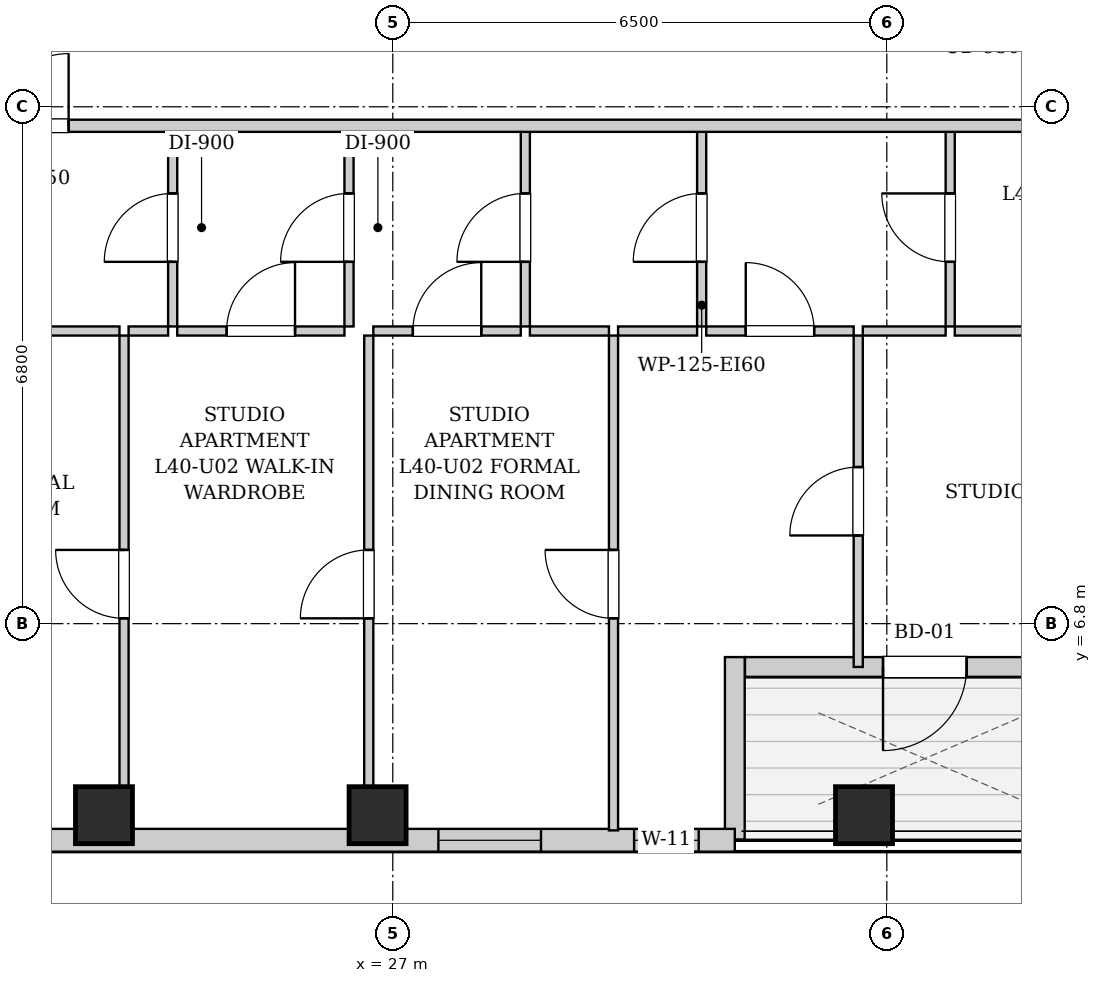
"""IFC4 building model, lengths in metres.
Left out: names, types, materials, properties, quantities, classifications, styles, units other than length and angle.
Written with IfcOpenShell. Run it as: python <this file> out.ifc"""

import sys

from ifc_helpers import new_model, si_unit, direction, frame, frame_2d, origin, origin_2d, place, context, subcontext, project, spatial, rectangle, extrude, element, fill, save


model = new_model("IFC4")
c1 = context("Model", 3, precision=1e-05, world=origin(), true_north=direction((0.0, 1.0)))
c2 = subcontext(c1, "Body", "Model", "MODEL_VIEW")
j1 = project(units=[si_unit("LENGTHUNIT", "METRE"), si_unit("PLANEANGLEUNIT", "RADIAN")], contexts=[c1])
p1 = place(None, origin())
s1 = spatial("IfcSite", under=j1, at=p1, CompositionType="ELEMENT")
p2 = place(p1, origin())
s2 = spatial("IfcBuilding", under=s1, at=p2, CompositionType="ELEMENT")
p3 = place(p2, frame((0.0, 0.0, 140.65)))
s3 = spatial("IfcBuildingStorey", under=s2, at=p3, CompositionType="ELEMENT", Elevation=140.65)
for number, where, z_axis, x_axis in (
    (1, (23.2, 4.28, 0.0), (0.0, 0.0, 1.0), (1.0, 0.0, 0.0)),
    (2, (26.8, 4.28, 0.0), (0.0, 0.0, 1.0), (1.0, 0.0, 0.0)),
    (3, (33.2, 4.28, 0.0), (0.0, 0.0, 1.0), (1.0, 0.0, 0.0)),
):
    element("IfcColumn", number, at=place(p3, frame(where, z_axis=z_axis, x_axis=x_axis)), inside=s3, PredefinedType="COLUMN", context=c2, shape_type="SweptSolid", body=[
        extrude(rectangle(XDim=0.75, YDim=0.75, at=origin_2d()), origin(), (0.0, 0.0, 1.0), 3.25),
    ])
p4 = place(p3, frame((36.366, 6.23, 0.0), z_axis=(0.0, 0.0, 1.0), x_axis=(-1.0, 0.0, 0.0)))
e4 = element("IfcWall", 4, at=p4, inside=s3, PredefinedType="SOLIDWALL", context=c2, shape_type="SweptSolid", body=[
    extrude(rectangle(XDim=4.732, YDim=0.26, at=frame_2d((2.366, 0.0))), origin(), (0.0, 0.0, 1.0), 2.99),
])
p5 = place(p4, frame((1.816, 0.0, 0.0)))
e5 = element("IfcOpeningElement", 5, at=p5, cuts=e4, PredefinedType="OPENING", context=c2, shape_type="SweptSolid", body=[
    extrude(rectangle(XDim=1.1, YDim=2.0, at=frame_2d((0.55, 1.0))), frame((0.0, 0.14, 0.0), z_axis=(0.0, -1.0, 0.0), x_axis=(1.0, 0.0, 0.0)), (0.0, 0.0, 1.0), 0.28),
])
p6 = place(p3, frame((31.5, 6.36, 0.0), z_axis=(0.0, 0.0, 1.0), x_axis=(0.0, -1.0, 0.0)))
e6 = element("IfcWall", 6, at=p6, inside=s3, PredefinedType="SOLIDWALL", context=c2, shape_type="SweptSolid", body=[
    extrude(rectangle(XDim=2.4, YDim=0.26, at=frame_2d((1.2, 0.0))), origin(), (0.0, 0.0, 1.0), 2.99),
])
p7 = place(p3, frame((31.5, 3.95, 0.0), z_axis=(0.0, 0.0, 1.0), x_axis=(-1.0, 0.0, 0.0)))
e7 = element("IfcWall", 7, at=p7, inside=s3, PredefinedType="SOLIDWALL", context=c2, shape_type="SweptSolid", body=[
    extrude(rectangle(XDim=13.2, YDim=0.3, at=frame_2d((6.6, 0.0))), origin(), (0.0, 0.0, 1.0), 2.99),
])
p8 = place(p7, frame((11.476, 0.0, 0.55)))
e8 = element("IfcOpeningElement", 8, at=p8, cuts=e7, PredefinedType="OPENING", context=c2, shape_type="SweptSolid", body=[
    extrude(rectangle(XDim=1.35, YDim=1.2, at=frame_2d((0.675, 0.6))), frame((0.0, 0.16, 0.0), z_axis=(0.0, -1.0, 0.0), x_axis=(1.0, 0.0, 0.0)), (0.0, 0.0, 1.0), 0.32),
])
p9 = place(p7, frame((9.0, 0.0, 0.55)))
e9 = element("IfcOpeningElement", 9, at=p9, cuts=e7, PredefinedType="OPENING", context=c2, shape_type="SweptSolid", body=[
    extrude(rectangle(XDim=1.35, YDim=1.2, at=frame_2d((0.675, 0.6))), frame((0.0, 0.16, 0.0), z_axis=(0.0, -1.0, 0.0), x_axis=(1.0, 0.0, 0.0)), (0.0, 0.0, 1.0), 0.32),
])
p10 = place(p7, frame((2.55, 0.0, 0.55)))
e10 = element("IfcOpeningElement", 10, at=p10, cuts=e7, PredefinedType="OPENING", context=c2, shape_type="SweptSolid", body=[
    extrude(rectangle(XDim=1.35, YDim=1.2, at=frame_2d((0.675, 0.6))), frame((0.0, 0.16, 0.0), z_axis=(0.0, -1.0, 0.0), x_axis=(1.0, 0.0, 0.0)), (0.0, 0.0, 1.0), 0.32),
])
p11 = place(p7, frame((0.475, 0.0, 0.55)))
e11 = element("IfcOpeningElement", 11, at=p11, cuts=e7, PredefinedType="OPENING", context=c2, shape_type="SweptSolid", body=[
    extrude(rectangle(XDim=0.85, YDim=1.2, at=frame_2d((0.425, 0.6))), frame((0.0, 0.16, 0.0), z_axis=(0.0, -1.0, 0.0), x_axis=(1.0, 0.0, 0.0)), (0.0, 0.0, 1.0), 0.32),
])
p12 = place(p3, frame((24.104, 10.71, 0.0), z_axis=(0.0, 0.0, 1.0), x_axis=(0.0, 1.0, 0.0)))
e12 = element("IfcWall", 12, at=p12, inside=s3, PredefinedType="PARTITIONING", context=c2, shape_type="SweptSolid", body=[
    extrude(rectangle(XDim=2.6, YDim=0.12, at=frame_2d((1.3, 0.0))), origin(), (0.0, 0.0, 1.0), 2.99),
])
p13 = place(p12, frame((0.85, 0.0, 0.0)))
e13 = element("IfcOpeningElement", 13, at=p13, cuts=e12, PredefinedType="OPENING", context=c2, shape_type="SweptSolid", body=[
    extrude(rectangle(XDim=0.9, YDim=2.05, at=frame_2d((0.45, 1.025))), frame((0.0, 0.07, 0.0), z_axis=(0.0, -1.0, 0.0), x_axis=(1.0, 0.0, 0.0)), (0.0, 0.0, 1.0), 0.14),
])
p14 = place(p3, frame((20.304, 10.65, 0.0), z_axis=(0.0, 0.0, 1.0), x_axis=(1.0, 0.0, 0.0)))
e14 = element("IfcWall", 14, at=p14, inside=s3, PredefinedType="PARTITIONING", context=c2, shape_type="SweptSolid", body=[
    extrude(rectangle(XDim=3.1, YDim=0.12, at=frame_2d((1.55, 0.0))), origin(), (0.0, 0.0, 1.0), 2.99),
])
p15 = place(p14, frame((1.1, 0.0, 0.0)))
e15 = element("IfcOpeningElement", 15, at=p15, cuts=e14, PredefinedType="OPENING", context=c2, shape_type="SweptSolid", body=[
    extrude(rectangle(XDim=0.9, YDim=2.05, at=frame_2d((0.45, 1.025))), frame((0.0, 0.07, 0.0), z_axis=(0.0, -1.0, 0.0), x_axis=(1.0, 0.0, 0.0)), (0.0, 0.0, 1.0), 0.14),
])
p16 = place(p3, frame((23.524, 10.65, 0.0), z_axis=(0.0, 0.0, 1.0), x_axis=(1.0, 0.0, 0.0)))
e16 = element("IfcWall", 16, at=p16, inside=s3, PredefinedType="PARTITIONING", context=c2, shape_type="SweptSolid", body=[
    extrude(rectangle(XDim=0.52, YDim=0.12, at=frame_2d((0.26, 0.0))), origin(), (0.0, 0.0, 1.0), 2.99),
])
p17 = place(p3, frame((26.424, 10.71, 0.0), z_axis=(0.0, 0.0, 1.0), x_axis=(0.0, 1.0, 0.0)))
e17 = element("IfcWall", 17, at=p17, inside=s3, PredefinedType="PARTITIONING", context=c2, shape_type="SweptSolid", body=[
    extrude(rectangle(XDim=2.6, YDim=0.12, at=frame_2d((1.3, 0.0))), origin(), (0.0, 0.0, 1.0), 2.99),
])
p18 = place(p17, frame((0.85, 0.0, 0.0)))
e18 = element("IfcOpeningElement", 18, at=p18, cuts=e17, PredefinedType="OPENING", context=c2, shape_type="SweptSolid", body=[
    extrude(rectangle(XDim=0.9, YDim=2.05, at=frame_2d((0.45, 1.025))), frame((0.0, 0.07, 0.0), z_axis=(0.0, -1.0, 0.0), x_axis=(1.0, 0.0, 0.0)), (0.0, 0.0, 1.0), 0.14),
])
p19 = place(p3, frame((24.164, 10.65, 0.0), z_axis=(0.0, 0.0, 1.0), x_axis=(1.0, 0.0, 0.0)))
e19 = element("IfcWall", 19, at=p19, inside=s3, PredefinedType="PARTITIONING", context=c2, shape_type="SweptSolid", body=[
    extrude(rectangle(XDim=2.2, YDim=0.12, at=frame_2d((1.1, 0.0))), origin(), (0.0, 0.0, 1.0), 2.99),
])
p20 = place(p19, frame((0.65, 0.0, 0.0)))
e20 = element("IfcOpeningElement", 20, at=p20, cuts=e19, PredefinedType="OPENING", context=c2, shape_type="SweptSolid", body=[
    extrude(rectangle(XDim=0.9, YDim=2.05, at=frame_2d((0.45, 1.025))), frame((0.0, 0.07, 0.0), z_axis=(0.0, -1.0, 0.0), x_axis=(1.0, 0.0, 0.0)), (0.0, 0.0, 1.0), 0.14),
])
p21 = place(p3, frame((28.744, 10.71, 0.0), z_axis=(0.0, 0.0, 1.0), x_axis=(0.0, 1.0, 0.0)))
e21 = element("IfcWall", 21, at=p21, inside=s3, PredefinedType="PARTITIONING", context=c2, shape_type="SweptSolid", body=[
    extrude(rectangle(XDim=2.6, YDim=0.12, at=frame_2d((1.3, 0.0))), origin(), (0.0, 0.0, 1.0), 2.99),
])
p22 = place(p21, frame((0.85, 0.0, 0.0)))
e22 = element("IfcOpeningElement", 22, at=p22, cuts=e21, PredefinedType="OPENING", context=c2, shape_type="SweptSolid", body=[
    extrude(rectangle(XDim=0.9, YDim=2.05, at=frame_2d((0.45, 1.025))), frame((0.0, 0.07, 0.0), z_axis=(0.0, -1.0, 0.0), x_axis=(1.0, 0.0, 0.0)), (0.0, 0.0, 1.0), 0.14),
])
p23 = place(p3, frame((26.744, 10.65, 0.0), z_axis=(0.0, 0.0, 1.0), x_axis=(1.0, 0.0, 0.0)))
e23 = element("IfcWall", 23, at=p23, inside=s3, PredefinedType="PARTITIONING", context=c2, shape_type="SweptSolid", body=[
    extrude(rectangle(XDim=1.94, YDim=0.12, at=frame_2d((0.97, 0.0))), origin(), (0.0, 0.0, 1.0), 2.99),
])
p24 = place(p23, frame((0.52, 0.0, 0.0)))
e24 = element("IfcOpeningElement", 24, at=p24, cuts=e23, PredefinedType="OPENING", context=c2, shape_type="SweptSolid", body=[
    extrude(rectangle(XDim=0.9, YDim=2.05, at=frame_2d((0.45, 1.025))), frame((0.0, 0.07, 0.0), z_axis=(0.0, -1.0, 0.0), x_axis=(1.0, 0.0, 0.0)), (0.0, 0.0, 1.0), 0.14),
])
p25 = place(p3, frame((31.064, 10.71, 0.0), z_axis=(0.0, 0.0, 1.0), x_axis=(0.0, 1.0, 0.0)))
e25 = element("IfcWall", 25, at=p25, inside=s3, PredefinedType="PARTITIONING", context=c2, shape_type="SweptSolid", body=[
    extrude(rectangle(XDim=2.6, YDim=0.12, at=frame_2d((1.3, 0.0))), origin(), (0.0, 0.0, 1.0), 2.99),
])
p26 = place(p25, frame((0.85, 0.0, 0.0)))
e26 = element("IfcOpeningElement", 26, at=p26, cuts=e25, PredefinedType="OPENING", context=c2, shape_type="SweptSolid", body=[
    extrude(rectangle(XDim=0.9, YDim=2.05, at=frame_2d((0.45, 1.025))), frame((0.0, 0.07, 0.0), z_axis=(0.0, -1.0, 0.0), x_axis=(1.0, 0.0, 0.0)), (0.0, 0.0, 1.0), 0.14),
])
p27 = place(p3, frame((28.804, 10.65, 0.0), z_axis=(0.0, 0.0, 1.0), x_axis=(1.0, 0.0, 0.0)))
e27 = element("IfcWall", 27, at=p27, inside=s3, PredefinedType="PARTITIONING", context=c2, shape_type="SweptSolid", body=[
    extrude(rectangle(XDim=1.04, YDim=0.12, at=frame_2d((0.52, 0.0))), origin(), (0.0, 0.0, 1.0), 2.99),
])
p28 = place(p3, frame((29.964, 10.65, 0.0), z_axis=(0.0, 0.0, 1.0), x_axis=(1.0, 0.0, 0.0)))
e28 = element("IfcWall", 28, at=p28, inside=s3, PredefinedType="PARTITIONING", context=c2, shape_type="SweptSolid", body=[
    extrude(rectangle(XDim=1.04, YDim=0.12, at=frame_2d((0.52, 0.0))), origin(), (0.0, 0.0, 1.0), 2.99),
])
p29 = place(p3, frame((34.334, 10.71, 0.0), z_axis=(0.0, 0.0, 1.0), x_axis=(0.0, 1.0, 0.0)))
e29 = element("IfcWall", 29, at=p29, inside=s3, PredefinedType="PARTITIONING", context=c2, shape_type="SweptSolid", body=[
    extrude(rectangle(XDim=2.6, YDim=0.12, at=frame_2d((1.3, 0.0))), origin(), (0.0, 0.0, 1.0), 2.99),
])
p30 = place(p29, frame((0.85, 0.0, 0.0)))
e30 = element("IfcOpeningElement", 30, at=p30, cuts=e29, PredefinedType="OPENING", context=c2, shape_type="SweptSolid", body=[
    extrude(rectangle(XDim=0.9, YDim=2.05, at=frame_2d((0.45, 1.025))), frame((0.0, 0.07, 0.0), z_axis=(0.0, -1.0, 0.0), x_axis=(1.0, 0.0, 0.0)), (0.0, 0.0, 1.0), 0.14),
])
p31 = place(p3, frame((31.124, 10.65, 0.0), z_axis=(0.0, 0.0, 1.0), x_axis=(1.0, 0.0, 0.0)))
e31 = element("IfcWall", 31, at=p31, inside=s3, PredefinedType="PARTITIONING", context=c2, shape_type="SweptSolid", body=[
    extrude(rectangle(XDim=1.94, YDim=0.12, at=frame_2d((0.97, 0.0))), origin(), (0.0, 0.0, 1.0), 2.99),
])
p32 = place(p31, frame((0.52, 0.0, 0.0)))
e32 = element("IfcOpeningElement", 32, at=p32, cuts=e31, PredefinedType="OPENING", context=c2, shape_type="SweptSolid", body=[
    extrude(rectangle(XDim=0.9, YDim=2.05, at=frame_2d((0.45, 1.025))), frame((0.0, 0.07, 0.0), z_axis=(0.0, -1.0, 0.0), x_axis=(1.0, 0.0, 0.0)), (0.0, 0.0, 1.0), 0.14),
])
p33 = place(p3, frame((33.184, 10.65, 0.0), z_axis=(0.0, 0.0, 1.0), x_axis=(1.0, 0.0, 0.0)))
e33 = element("IfcWall", 33, at=p33, inside=s3, PredefinedType="PARTITIONING", context=c2, shape_type="SweptSolid", body=[
    extrude(rectangle(XDim=1.09, YDim=0.12, at=frame_2d((0.545, 0.0))), origin(), (0.0, 0.0, 1.0), 2.99),
])
p34 = place(p3, frame((34.394, 10.65, 0.0), z_axis=(0.0, 0.0, 1.0), x_axis=(1.0, 0.0, 0.0)))
e34 = element("IfcWall", 34, at=p34, inside=s3, PredefinedType="PARTITIONING", context=c2, shape_type="SweptSolid", body=[
    extrude(rectangle(XDim=3.326, YDim=0.12, at=frame_2d((1.663, 0.0))), origin(), (0.0, 0.0, 1.0), 2.99),
])
p35 = place(p34, frame((1.213, 0.0, 0.0)))
e35 = element("IfcOpeningElement", 35, at=p35, cuts=e34, PredefinedType="OPENING", context=c2, shape_type="SweptSolid", body=[
    extrude(rectangle(XDim=0.9, YDim=2.05, at=frame_2d((0.45, 1.025))), frame((0.0, 0.07, 0.0), z_axis=(0.0, -1.0, 0.0), x_axis=(1.0, 0.0, 0.0)), (0.0, 0.0, 1.0), 0.14),
])
p36 = place(p3, frame((23.464, 4.08, 0.0), z_axis=(0.0, 0.0, 1.0), x_axis=(0.0, 1.0, 0.0)))
e36 = element("IfcWall", 36, at=p36, inside=s3, PredefinedType="PARTITIONING", context=c2, shape_type="SweptSolid", body=[
    extrude(rectangle(XDim=6.51, YDim=0.12, at=frame_2d((3.255, 0.0))), origin(), (0.0, 0.0, 1.0), 2.99),
])
p37 = place(p36, frame((2.79, 0.0, 0.0)))
e37 = element("IfcOpeningElement", 37, at=p37, cuts=e36, PredefinedType="OPENING", context=c2, shape_type="SweptSolid", body=[
    extrude(rectangle(XDim=0.9, YDim=2.05, at=frame_2d((0.45, 1.025))), frame((0.0, 0.07, 0.0), z_axis=(0.0, -1.0, 0.0), x_axis=(1.0, 0.0, 0.0)), (0.0, 0.0, 1.0), 0.14),
])
p38 = place(p3, frame((26.684, 4.08, 0.0), z_axis=(0.0, 0.0, 1.0), x_axis=(0.0, 1.0, 0.0)))
e38 = element("IfcWall", 38, at=p38, inside=s3, PredefinedType="PARTITIONING", context=c2, shape_type="SweptSolid", body=[
    extrude(rectangle(XDim=6.51, YDim=0.12, at=frame_2d((3.255, 0.0))), origin(), (0.0, 0.0, 1.0), 2.99),
])
p39 = place(p38, frame((2.79, 0.0, 0.0)))
e39 = element("IfcOpeningElement", 39, at=p39, cuts=e38, PredefinedType="OPENING", context=c2, shape_type="SweptSolid", body=[
    extrude(rectangle(XDim=0.9, YDim=2.05, at=frame_2d((0.45, 1.025))), frame((0.0, 0.07, 0.0), z_axis=(0.0, -1.0, 0.0), x_axis=(1.0, 0.0, 0.0)), (0.0, 0.0, 1.0), 0.14),
])
p40 = place(p3, frame((29.904, 4.08, 0.0), z_axis=(0.0, 0.0, 1.0), x_axis=(0.0, 1.0, 0.0)))
e40 = element("IfcWall", 40, at=p40, inside=s3, PredefinedType="PARTITIONING", context=c2, shape_type="SweptSolid", body=[
    extrude(rectangle(XDim=6.51, YDim=0.12, at=frame_2d((3.255, 0.0))), origin(), (0.0, 0.0, 1.0), 2.99),
])
p41 = place(p40, frame((2.79, 0.0, 0.0)))
e41 = element("IfcOpeningElement", 41, at=p41, cuts=e40, PredefinedType="OPENING", context=c2, shape_type="SweptSolid", body=[
    extrude(rectangle(XDim=0.9, YDim=2.05, at=frame_2d((0.45, 1.025))), frame((0.0, 0.07, 0.0), z_axis=(0.0, -1.0, 0.0), x_axis=(1.0, 0.0, 0.0)), (0.0, 0.0, 1.0), 0.14),
])
p42 = place(p3, frame((33.124, 6.23, 0.0), z_axis=(0.0, 0.0, 1.0), x_axis=(0.0, 1.0, 0.0)))
e42 = element("IfcWall", 42, at=p42, inside=s3, PredefinedType="PARTITIONING", context=c2, shape_type="SweptSolid", body=[
    extrude(rectangle(XDim=4.36, YDim=0.12, at=frame_2d((2.18, 0.0))), origin(), (0.0, 0.0, 1.0), 2.426),
])
p43 = place(p42, frame((1.73, 0.0, 0.0)))
e43 = element("IfcOpeningElement", 43, at=p43, cuts=e42, PredefinedType="OPENING", context=c2, shape_type="SweptSolid", body=[
    extrude(rectangle(XDim=0.9, YDim=2.05, at=frame_2d((0.45, 1.025))), frame((0.0, 0.07, 0.0), z_axis=(0.0, -1.0, 0.0), x_axis=(1.0, 0.0, 0.0)), (0.0, 0.0, 1.0), 0.14),
])
p44 = place(p3, frame((10.05, 13.35, 0.0), z_axis=(0.0, 0.0, 1.0), x_axis=(1.0, 0.0, 0.0)))
e44 = element("IfcWall", 44, at=p44, inside=s3, PredefinedType="PARTITIONING", context=c2, shape_type="SweptSolid", body=[
    extrude(rectangle(XDim=27.7, YDim=0.16, at=frame_2d((13.85, 0.0))), origin(), (0.0, 0.0, 1.0), 2.99),
])
p45 = place(p44, frame((4.063, 0.0, 0.0)))
e45 = element("IfcOpeningElement", 45, at=p45, cuts=e44, PredefinedType="OPENING", context=c2, shape_type="SweptSolid", body=[
    extrude(rectangle(XDim=0.95, YDim=2.1, at=frame_2d((0.475, 1.05))), frame((0.0, 0.09, 0.0), z_axis=(0.0, -1.0, 0.0), x_axis=(1.0, 0.0, 0.0)), (0.0, 0.0, 1.0), 0.18),
])
p46 = place(p44, frame((11.735, 0.0, 0.0)))
e46 = element("IfcOpeningElement", 46, at=p46, cuts=e44, PredefinedType="OPENING", context=c2, shape_type="SweptSolid", body=[
    extrude(rectangle(XDim=0.95, YDim=2.1, at=frame_2d((0.475, 1.05))), frame((0.0, 0.09, 0.0), z_axis=(0.0, -1.0, 0.0), x_axis=(1.0, 0.0, 0.0)), (0.0, 0.0, 1.0), 0.18),
])
p47 = place(p13, origin())
e47 = element("IfcDoor", 47, at=p47, inside=s3, OperationType="SINGLE_SWING_LEFT", PredefinedType="DOOR", context=c2, shape_type="SweptSolid", body=[
    extrude(rectangle(XDim=0.9, YDim=2.05, at=frame_2d((0.45, 1.025))), frame((0.0, 0.025, 0.0), z_axis=(0.0, -1.0, 0.0), x_axis=(1.0, 0.0, 0.0)), (0.0, 0.0, 1.0), 0.05),
])
fill(e13, e47)
p48 = place(p18, origin())
e48 = element("IfcDoor", 48, at=p48, inside=s3, OperationType="SINGLE_SWING_LEFT", PredefinedType="DOOR", context=c2, shape_type="SweptSolid", body=[
    extrude(rectangle(XDim=0.9, YDim=2.05, at=frame_2d((0.45, 1.025))), frame((0.0, 0.025, 0.0), z_axis=(0.0, -1.0, 0.0), x_axis=(1.0, 0.0, 0.0)), (0.0, 0.0, 1.0), 0.05),
])
fill(e18, e48)
p49 = place(p20, origin())
e49 = element("IfcDoor", 49, at=p49, inside=s3, OperationType="SINGLE_SWING_RIGHT", PredefinedType="DOOR", context=c2, shape_type="SweptSolid", body=[
    extrude(rectangle(XDim=0.9, YDim=2.05, at=frame_2d((0.45, 1.025))), frame((0.0, 0.025, 0.0), z_axis=(0.0, -1.0, 0.0), x_axis=(1.0, 0.0, 0.0)), (0.0, 0.0, 1.0), 0.05),
])
fill(e20, e49)
p50 = place(p22, origin())
e50 = element("IfcDoor", 50, at=p50, inside=s3, OperationType="SINGLE_SWING_LEFT", PredefinedType="DOOR", context=c2, shape_type="SweptSolid", body=[
    extrude(rectangle(XDim=0.9, YDim=2.05, at=frame_2d((0.45, 1.025))), frame((0.0, 0.025, 0.0), z_axis=(0.0, -1.0, 0.0), x_axis=(1.0, 0.0, 0.0)), (0.0, 0.0, 1.0), 0.05),
])
fill(e22, e50)
p51 = place(p24, origin())
e51 = element("IfcDoor", 51, at=p51, inside=s3, OperationType="SINGLE_SWING_RIGHT", PredefinedType="DOOR", context=c2, shape_type="SweptSolid", body=[
    extrude(rectangle(XDim=0.9, YDim=2.05, at=frame_2d((0.45, 1.025))), frame((0.0, 0.025, 0.0), z_axis=(0.0, -1.0, 0.0), x_axis=(1.0, 0.0, 0.0)), (0.0, 0.0, 1.0), 0.05),
])
fill(e24, e51)
p52 = place(p26, origin())
e52 = element("IfcDoor", 52, at=p52, inside=s3, OperationType="SINGLE_SWING_LEFT", PredefinedType="DOOR", context=c2, shape_type="SweptSolid", body=[
    extrude(rectangle(XDim=0.9, YDim=2.05, at=frame_2d((0.45, 1.025))), frame((0.0, 0.025, 0.0), z_axis=(0.0, -1.0, 0.0), x_axis=(1.0, 0.0, 0.0)), (0.0, 0.0, 1.0), 0.05),
])
fill(e26, e52)
p53 = place(p30, origin())
e53 = element("IfcDoor", 53, at=p53, inside=s3, OperationType="SINGLE_SWING_RIGHT", PredefinedType="DOOR", context=c2, shape_type="SweptSolid", body=[
    extrude(rectangle(XDim=0.9, YDim=2.05, at=frame_2d((0.45, 1.025))), frame((0.0, 0.025, 0.0), z_axis=(0.0, -1.0, 0.0), x_axis=(1.0, 0.0, 0.0)), (0.0, 0.0, 1.0), 0.05),
])
fill(e30, e53)
p54 = place(p32, origin())
e54 = element("IfcDoor", 54, at=p54, inside=s3, OperationType="SINGLE_SWING_LEFT", PredefinedType="DOOR", context=c2, shape_type="SweptSolid", body=[
    extrude(rectangle(XDim=0.9, YDim=2.05, at=frame_2d((0.45, 1.025))), frame((0.0, 0.025, 0.0), z_axis=(0.0, -1.0, 0.0), x_axis=(1.0, 0.0, 0.0)), (0.0, 0.0, 1.0), 0.05),
])
fill(e32, e54)
p55 = place(p37, origin())
e55 = element("IfcDoor", 55, at=p55, inside=s3, OperationType="SINGLE_SWING_RIGHT", PredefinedType="DOOR", context=c2, shape_type="SweptSolid", body=[
    extrude(rectangle(XDim=0.9, YDim=2.05, at=frame_2d((0.45, 1.025))), frame((0.0, 0.025, 0.0), z_axis=(0.0, -1.0, 0.0), x_axis=(1.0, 0.0, 0.0)), (0.0, 0.0, 1.0), 0.05),
])
fill(e37, e55)
p56 = place(p39, origin())
e56 = element("IfcDoor", 56, at=p56, inside=s3, OperationType="SINGLE_SWING_LEFT", PredefinedType="DOOR", context=c2, shape_type="SweptSolid", body=[
    extrude(rectangle(XDim=0.9, YDim=2.05, at=frame_2d((0.45, 1.025))), frame((0.0, 0.025, 0.0), z_axis=(0.0, -1.0, 0.0), x_axis=(1.0, 0.0, 0.0)), (0.0, 0.0, 1.0), 0.05),
])
fill(e39, e56)
p57 = place(p41, origin())
e57 = element("IfcDoor", 57, at=p57, inside=s3, OperationType="SINGLE_SWING_RIGHT", PredefinedType="DOOR", context=c2, shape_type="SweptSolid", body=[
    extrude(rectangle(XDim=0.9, YDim=2.05, at=frame_2d((0.45, 1.025))), frame((0.0, 0.025, 0.0), z_axis=(0.0, -1.0, 0.0), x_axis=(1.0, 0.0, 0.0)), (0.0, 0.0, 1.0), 0.05),
])
fill(e41, e57)
p58 = place(p43, origin())
e58 = element("IfcDoor", 58, at=p58, inside=s3, OperationType="SINGLE_SWING_LEFT", PredefinedType="DOOR", context=c2, shape_type="SweptSolid", body=[
    extrude(rectangle(XDim=0.9, YDim=2.05, at=frame_2d((0.45, 1.025))), frame((0.0, 0.025, 0.0), z_axis=(0.0, -1.0, 0.0), x_axis=(1.0, 0.0, 0.0)), (0.0, 0.0, 1.0), 0.05),
])
fill(e43, e58)
p59 = place(p46, origin())
e59 = element("IfcDoor", 59, at=p59, inside=s3, OperationType="SINGLE_SWING_RIGHT", PredefinedType="DOOR", context=c2, shape_type="SweptSolid", body=[
    extrude(rectangle(XDim=0.95, YDim=2.1, at=frame_2d((0.475, 1.05))), frame((0.0, 0.025, 0.0), z_axis=(0.0, -1.0, 0.0), x_axis=(1.0, 0.0, 0.0)), (0.0, 0.0, 1.0), 0.05),
])
fill(e46, e59)
p60 = place(p5, origin())
e60 = element("IfcDoor", 60, at=p60, inside=s3, OperationType="SINGLE_SWING_RIGHT", PredefinedType="DOOR", context=c2, shape_type="SweptSolid", body=[
    extrude(rectangle(XDim=1.1, YDim=2.0, at=frame_2d((0.55, 1.0))), frame((0.0, 0.025, 0.0), z_axis=(0.0, -1.0, 0.0), x_axis=(1.0, 0.0, 0.0)), (0.0, 0.0, 1.0), 0.05),
])
fill(e5, e60)
p61 = place(p10, origin())
e61 = element("IfcWindow", 61, at=p61, inside=s3, PartitioningType="SINGLE_PANEL", PredefinedType="WINDOW", context=c2, shape_type="SweptSolid", body=[
    extrude(rectangle(XDim=1.35, YDim=1.2, at=frame_2d((0.675, 0.6))), frame((0.0, 0.03, 0.0), z_axis=(0.0, -1.0, 0.0), x_axis=(1.0, 0.0, 0.0)), (0.0, 0.0, 1.0), 0.06),
])
fill(e10, e61)
p62 = place(p11, origin())
e62 = element("IfcWindow", 62, at=p62, inside=s3, PartitioningType="SINGLE_PANEL", PredefinedType="WINDOW", context=c2, shape_type="SweptSolid", body=[
    extrude(rectangle(XDim=0.85, YDim=1.2, at=frame_2d((0.425, 0.6))), frame((0.0, 0.03, 0.0), z_axis=(0.0, -1.0, 0.0), x_axis=(1.0, 0.0, 0.0)), (0.0, 0.0, 1.0), 0.06),
])
fill(e11, e62)
save(model, sys.argv[1])
